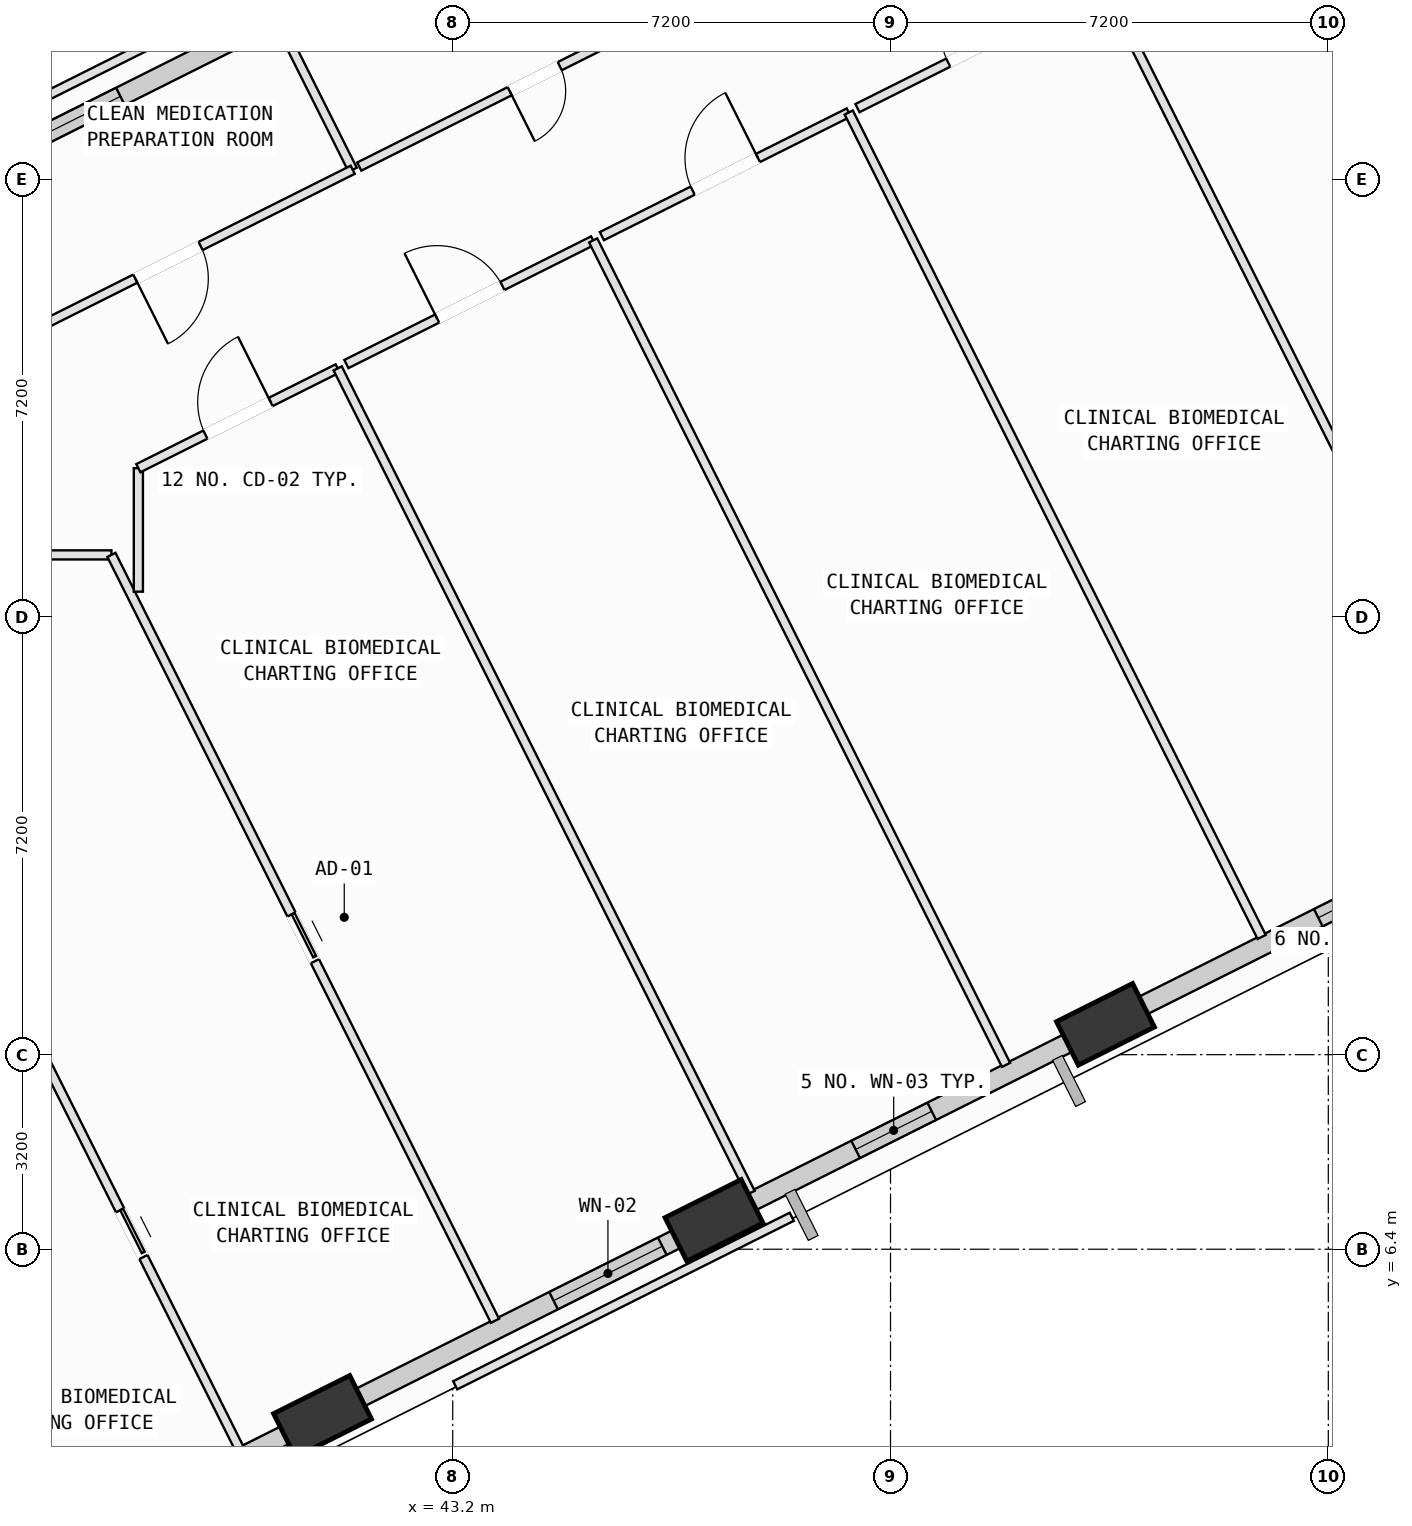
"""IFC4 building model, lengths in metres.
Left out: names, types, materials, properties, quantities, classifications, styles, units other than length and angle.
Written with IfcOpenShell. Run it as: python <this file> out.ifc"""

import sys

from ifc_helpers import new_model, si_unit, direction, frame, frame_2d, origin, origin_2d, place, context, subcontext, project, spatial, rectangle, extrude, element, fill, save


model = new_model("IFC4")
c1 = context("Model", 3, precision=1e-05, world=origin(), true_north=direction((0.0, 1.0)))
c2 = subcontext(c1, "Body", "Model", "MODEL_VIEW")
j1 = project(units=[si_unit("LENGTHUNIT", "METRE"), si_unit("PLANEANGLEUNIT", "RADIAN")], contexts=[c1])
p1 = place(None, origin())
s1 = spatial("IfcSite", under=j1, at=p1, CompositionType="ELEMENT")
p2 = place(p1, origin())
s2 = spatial("IfcBuilding", under=s1, at=p2, CompositionType="ELEMENT")
p3 = place(p2, frame((0.0, 0.0, 136.4)))
s3 = spatial("IfcBuildingStorey", under=s2, at=p3, CompositionType="ELEMENT", Elevation=136.4)
p4 = place(p3, frame((41.059, 3.651, 0.002), z_axis=(0.087045946082, 0.031509294249, 0.995705864021), x_axis=(-0.7235601559, 0.68901563881, 0.041450576223)))
e1 = element("IfcColumn", 1, at=p4, inside=s3, PredefinedType="COLUMN", context=c2, shape_type="SweptSolid", body=[
    extrude(rectangle(XDim=1.4, YDim=0.8, at=origin_2d()), origin(), (0.0, 0.0, 1.0), 4.014),
])
p5 = place(p3, frame((47.497, 6.875, 0.002), z_axis=(0.073474149126, 0.057964291488, 0.995611214442), x_axis=(-0.903804980406, 0.425888036512, 0.041903910901)))
e2 = element("IfcColumn", 2, at=p5, inside=s3, PredefinedType="COLUMN", context=c2, shape_type="SweptSolid", body=[
    extrude(rectangle(XDim=1.4, YDim=0.8, at=origin_2d()), origin(), (0.0, 0.0, 1.0), 4.014),
])
p6 = place(p3, frame((53.935, 10.099, 0.002), z_axis=(0.059912602707, 0.084339444784, 0.994634273535), x_axis=(-0.986866301457, 0.154755115005, 0.046322321071)))
e3 = element("IfcColumn", 3, at=p6, inside=s3, PredefinedType="COLUMN", context=c2, shape_type="SweptSolid", body=[
    extrude(rectangle(XDim=1.4, YDim=0.8, at=origin_2d()), origin(), (0.0, 0.0, 1.0), 4.018),
])
p7 = place(p3, frame((40.781, 3.512, 0.0), z_axis=(0.0, 0.0, 1.0), x_axis=(-0.894152006982, -0.447763540734, 0.0)))
e4 = element("IfcWall", 4, at=p7, inside=s3, PredefinedType="SOLIDWALL", context=c2, shape_type="SweptSolid", body=[
    extrude(rectangle(XDim=6.214, YDim=0.32, at=frame_2d((3.107, 0.0))), origin(), (0.0, 0.0, 1.0), 3.165),
])
p8 = place(p7, frame((2.619, 0.0, 0.75)))
e5 = element("IfcOpeningElement", 5, at=p8, cuts=e4, PredefinedType="OPENING", context=c2, shape_type="SweptSolid", body=[
    extrude(rectangle(XDim=1.6, YDim=1.95, at=frame_2d((0.8, 0.975))), frame((0.0, 0.17, 0.0), z_axis=(0.0, -1.0, 0.0), x_axis=(1.0, 0.0, 0.0)), (0.0, 0.0, 1.0), 0.34),
])
p9 = place(p3, frame((47.219, 6.736, 0.0), z_axis=(0.0, 0.0, 1.0), x_axis=(-0.894159648303, -0.447748281232, 0.0)))
e6 = element("IfcWall", 6, at=p9, inside=s3, PredefinedType="SOLIDWALL", context=c2, shape_type="SweptSolid", body=[
    extrude(rectangle(XDim=6.209, YDim=0.32, at=frame_2d((3.104, 0.0))), origin(), (0.0, 0.0, 1.0), 3.165),
])
p10 = place(p9, frame((0.64, 0.0, 0.75)))
e7 = element("IfcOpeningElement", 7, at=p10, cuts=e6, PredefinedType="OPENING", context=c2, shape_type="SweptSolid", body=[
    extrude(rectangle(XDim=2.0, YDim=1.95, at=frame_2d((1.0, 0.975))), frame((0.0, 0.17, 0.0), z_axis=(0.0, -1.0, 0.0), x_axis=(1.0, 0.0, 0.0)), (0.0, 0.0, 1.0), 0.34),
])
p11 = place(p3, frame((53.664, 9.963, 0.0), z_axis=(0.0, 0.0, 1.0), x_axis=(-0.894160047845, -0.447747483341, 0.0)))
e8 = element("IfcWall", 8, at=p11, inside=s3, PredefinedType="SOLIDWALL", context=c2, shape_type="SweptSolid", body=[
    extrude(rectangle(XDim=6.218, YDim=0.32, at=frame_2d((3.109, 0.0))), origin(), (0.0, 0.0, 1.0), 3.165),
])
p12 = place(p11, frame((2.892, 0.0, 0.75)))
e9 = element("IfcOpeningElement", 9, at=p12, cuts=e8, PredefinedType="OPENING", context=c2, shape_type="SweptSolid", body=[
    extrude(rectangle(XDim=1.4, YDim=1.85, at=frame_2d((0.7, 0.925))), frame((0.0, 0.17, 0.0), z_axis=(0.0, -1.0, 0.0), x_axis=(1.0, 0.0, 0.0)), (0.0, 0.0, 1.0), 0.34),
])
p13 = place(p3, frame((60.116, 13.194, 0.0), z_axis=(0.0, 0.0, 1.0), x_axis=(-0.894161076432, -0.447745429227, 0.0)))
e10 = element("IfcWall", 10, at=p13, inside=s3, PredefinedType="SOLIDWALL", context=c2, shape_type="SweptSolid", body=[
    extrude(rectangle(XDim=6.242, YDim=0.32, at=frame_2d((3.121, 0.0))), origin(), (0.0, 0.0, 1.0), 3.165),
])
p14 = place(p13, frame((1.198, 0.0, 0.75)))
e11 = element("IfcOpeningElement", 11, at=p14, cuts=e10, PredefinedType="OPENING", context=c2, shape_type="SweptSolid", body=[
    extrude(rectangle(XDim=1.8, YDim=2.05, at=frame_2d((0.9, 1.025))), frame((0.0, 0.17, 0.0), z_axis=(0.0, -1.0, 0.0), x_axis=(1.0, 0.0, 0.0)), (0.0, 0.0, 1.0), 0.34),
])
p15 = place(p3, frame((53.303, 32.8, 0.0), z_axis=(0.0, 0.0, 1.0), x_axis=(0.579127420341, -0.815237039768, 0.0)))
e12 = element("IfcWall", 12, at=p15, inside=s3, PredefinedType="SOLIDWALL", context=c2, shape_type="SweptSolid", body=[
    extrude(rectangle(XDim=8.838, YDim=0.32, at=frame_2d((4.419, 0.0))), origin(), (0.0, 0.0, 1.0), 3.165),
])
p16 = place(p3, frame((35.016, 23.999, 0.0), z_axis=(0.0, 0.0, 1.0), x_axis=(0.89415974242, 0.447748093279, 0.0)))
e13 = element("IfcWall", 13, at=p16, inside=s3, PredefinedType="SOLIDWALL", context=c2, shape_type="SweptSolid", body=[
    extrude(rectangle(XDim=6.211, YDim=0.32, at=frame_2d((3.105, 0.0))), origin(), (0.0, 0.0, 1.0), 3.165),
])
p17 = place(p16, frame((1.241, 0.0, 0.75)))
e14 = element("IfcOpeningElement", 14, at=p17, cuts=e13, PredefinedType="OPENING", context=c2, shape_type="SweptSolid", body=[
    extrude(rectangle(XDim=1.8, YDim=2.05, at=frame_2d((0.9, 1.025))), frame((0.0, 0.17, 0.0), z_axis=(0.0, -1.0, 0.0), x_axis=(1.0, 0.0, 0.0)), (0.0, 0.0, 1.0), 0.34),
])
p18 = place(p3, frame((36.15, 10.194, 0.0), z_axis=(0.0, 0.0, 1.0), x_axis=(0.447781215356, -0.894143155862, 0.0)))
e15 = element("IfcWall", 15, at=p18, inside=s3, PredefinedType="PARTITIONING", context=c2, shape_type="SweptSolid", body=[
    extrude(rectangle(XDim=7.913, YDim=0.15, at=frame_2d((3.957, 0.0))), origin(), (0.0, 0.0, 1.0), 3.78),
])
p19 = place(p18, frame((3.526, 0.0, 0.0)))
e16 = element("IfcOpeningElement", 16, at=p19, cuts=e15, PredefinedType="OPENING", context=c2, shape_type="SweptSolid", body=[
    extrude(rectangle(XDim=0.86, YDim=2.06, at=frame_2d((0.43, 1.03))), frame((0.0, 0.085, 0.0), z_axis=(0.0, -1.0, 0.0), x_axis=(1.0, 0.0, 0.0)), (0.0, 0.0, 1.0), 0.17),
])
p20 = place(p3, frame((36.5, 17.82, 0.0), z_axis=(0.0, 0.0, 1.0), x_axis=(1.0, 0.0, 0.0)))
e17 = element("IfcWall", 17, at=p20, inside=s3, PredefinedType="PARTITIONING", context=c2, shape_type="SweptSolid", body=[
    extrude(rectangle(XDim=1.087, YDim=0.15, at=frame_2d((0.543, 0.0))), origin(), (0.0, 0.0, 1.0), 2.965),
])
p21 = place(p3, frame((37.587, 17.82, 0.0), z_axis=(0.0, 0.0, 1.0), x_axis=(0.447754187631, -0.894156690664, 0.0)))
e18 = element("IfcWall", 18, at=p21, inside=s3, PredefinedType="PARTITIONING", context=c2, shape_type="SweptSolid", body=[
    extrude(rectangle(XDim=14.088, YDim=0.15, at=frame_2d((7.044, 0.0))), origin(), (0.0, 0.0, 1.0), 3.78),
])
p22 = place(p21, frame((6.614, 0.0, 0.0)))
e19 = element("IfcOpeningElement", 19, at=p22, cuts=e18, PredefinedType="OPENING", context=c2, shape_type="SweptSolid", body=[
    extrude(rectangle(XDim=0.86, YDim=2.06, at=frame_2d((0.43, 1.03))), frame((0.0, 0.085, 0.0), z_axis=(0.0, -1.0, 0.0), x_axis=(1.0, 0.0, 0.0)), (0.0, 0.0, 1.0), 0.17),
])
p23 = place(p3, frame((41.77, 3.75, 0.0), z_axis=(0.0, 0.0, 1.0), x_axis=(-0.893983331668, -0.448100215019, 0.0)))
e20 = element("IfcWall", 20, at=p23, inside=s3, PredefinedType="PARTITIONING", context=c2, shape_type="SweptSolid", body=[
    extrude(rectangle(XDim=0.991, YDim=0.15, at=frame_2d((0.496, 0.0))), origin(), (0.0, 0.0, 1.0), 3.165),
])
p24 = place(p3, frame((38.03, 17.215, 0.0), z_axis=(0.0, 0.0, 1.0), x_axis=(0.0, 1.0, 0.0)))
e21 = element("IfcWall", 21, at=p24, inside=s3, PredefinedType="PARTITIONING", context=c2, shape_type="SweptSolid", body=[
    extrude(rectangle(XDim=2.031, YDim=0.15, at=frame_2d((1.016, 0.0))), origin(), (0.0, 0.0, 1.0), 3.78),
])
p25 = place(p3, frame((38.03, 19.246, 0.0), z_axis=(0.0, 0.0, 1.0), x_axis=(0.894227304173, 0.447613146, 0.0)))
e22 = element("IfcWall", 22, at=p25, inside=s3, PredefinedType="PARTITIONING", context=c2, shape_type="SweptSolid", body=[
    extrude(rectangle(XDim=3.666, YDim=0.15, at=frame_2d((1.833, 0.0))), origin(), (0.0, 0.0, 1.0), 2.945),
])
p26 = place(p25, frame((1.233, 0.0, 0.0)))
e23 = element("IfcOpeningElement", 23, at=p26, cuts=e22, PredefinedType="OPENING", context=c2, shape_type="SweptSolid", body=[
    extrude(rectangle(XDim=1.2, YDim=2.15, at=frame_2d((0.6, 1.075))), frame((0.0, 0.085, 0.0), z_axis=(0.0, -1.0, 0.0), x_axis=(1.0, 0.0, 0.0)), (0.0, 0.0, 1.0), 0.17),
])
p27 = place(p3, frame((41.308, 20.887, 0.0), z_axis=(0.0, 0.0, 1.0), x_axis=(0.447793043956, -0.894137232076, 0.0)))
e24 = element("IfcWall", 24, at=p27, inside=s3, PredefinedType="PARTITIONING", context=c2, shape_type="SweptSolid", body=[
    extrude(rectangle(XDim=15.166, YDim=0.15, at=frame_2d((7.583, 0.0))), origin(), (0.0, 0.0, 1.0), 3.78),
])
p28 = place(p3, frame((41.451, 20.959, 0.0), z_axis=(0.0, 0.0, 1.0), x_axis=(0.894125827082, 0.447815816319, 0.0)))
e25 = element("IfcWall", 25, at=p28, inside=s3, PredefinedType="PARTITIONING", context=c2, shape_type="SweptSolid", body=[
    extrude(rectangle(XDim=4.54, YDim=0.15, at=frame_2d((2.27, 0.0))), origin(), (0.0, 0.0, 1.0), 3.78),
])
p29 = place(p28, frame((1.67, 0.0, 0.0)))
e26 = element("IfcOpeningElement", 26, at=p29, cuts=e25, PredefinedType="OPENING", context=c2, shape_type="SweptSolid", body=[
    extrude(rectangle(XDim=1.2, YDim=2.15, at=frame_2d((0.6, 1.075))), frame((0.0, 0.085, 0.0), z_axis=(0.0, -1.0, 0.0), x_axis=(1.0, 0.0, 0.0)), (0.0, 0.0, 1.0), 0.17),
])
p30 = place(p3, frame((45.51, 22.992, 0.0), z_axis=(0.0, 0.0, 1.0), x_axis=(0.447741560251, -0.894163013787, 0.0)))
e27 = element("IfcWall", 27, at=p30, inside=s3, PredefinedType="PARTITIONING", context=c2, shape_type="SweptSolid", body=[
    extrude(rectangle(XDim=15.165, YDim=0.15, at=frame_2d((7.583, 0.0))), origin(), (0.0, 0.0, 1.0), 3.365),
])
p31 = place(p3, frame((45.653, 23.063, 0.0), z_axis=(0.0, 0.0, 1.0), x_axis=(0.894158174305, 0.447751224815, 0.0)))
e28 = element("IfcWall", 28, at=p31, inside=s3, PredefinedType="PARTITIONING", context=c2, shape_type="SweptSolid", body=[
    extrude(rectangle(XDim=4.54, YDim=0.15, at=frame_2d((2.27, 0.0))), origin(), (0.0, 0.0, 1.0), 3.78),
])
p32 = place(p31, frame((1.67, 0.0, 0.0)))
e29 = element("IfcOpeningElement", 29, at=p32, cuts=e28, PredefinedType="OPENING", context=c2, shape_type="SweptSolid", body=[
    extrude(rectangle(XDim=1.2, YDim=2.15, at=frame_2d((0.6, 1.075))), frame((0.0, 0.085, 0.0), z_axis=(0.0, -1.0, 0.0), x_axis=(1.0, 0.0, 0.0)), (0.0, 0.0, 1.0), 0.17),
])
p33 = place(p3, frame((49.713, 25.096, 0.0), z_axis=(0.0, 0.0, 1.0), x_axis=(0.447793043956, -0.894137232076, 0.0)))
e30 = element("IfcWall", 30, at=p33, inside=s3, PredefinedType="PARTITIONING", context=c2, shape_type="SweptSolid", body=[
    extrude(rectangle(XDim=15.166, YDim=0.15, at=frame_2d((7.583, 0.0))), origin(), (0.0, 0.0, 1.0), 3.78),
])
p34 = place(p3, frame((54.637, 10.194, 0.0), z_axis=(0.0, 0.0, 1.0), x_axis=(-0.893975105613, -0.448116626052, 0.0)))
e31 = element("IfcWall", 31, at=p34, inside=s3, PredefinedType="PARTITIONING", context=c2, shape_type="SweptSolid", body=[
    extrude(rectangle(XDim=0.973, YDim=0.15, at=frame_2d((0.487, 0.0))), origin(), (0.0, 0.0, 1.0), 3.165),
])
p35 = place(p3, frame((49.856, 25.168, 0.0), z_axis=(0.0, 0.0, 1.0), x_axis=(0.894125827082, 0.447815816319, 0.0)))
e32 = element("IfcWall", 32, at=p35, inside=s3, PredefinedType="PARTITIONING", context=c2, shape_type="SweptSolid", body=[
    extrude(rectangle(XDim=4.54, YDim=0.15, at=frame_2d((2.27, 0.0))), origin(), (0.0, 0.0, 1.0), 3.78),
])
p36 = place(p35, frame((1.67, 0.0, 0.0)))
e33 = element("IfcOpeningElement", 33, at=p36, cuts=e32, PredefinedType="OPENING", context=c2, shape_type="SweptSolid", body=[
    extrude(rectangle(XDim=1.2, YDim=2.15, at=frame_2d((0.6, 1.075))), frame((0.0, 0.085, 0.0), z_axis=(0.0, -1.0, 0.0), x_axis=(1.0, 0.0, 0.0)), (0.0, 0.0, 1.0), 0.17),
])
p37 = place(p3, frame((53.915, 27.201, 0.0), z_axis=(0.0, 0.0, 1.0), x_axis=(0.447723711444, -0.894171951143, 0.0)))
e34 = element("IfcWall", 34, at=p37, inside=s3, PredefinedType="PARTITIONING", context=c2, shape_type="SweptSolid", body=[
    extrude(rectangle(XDim=14.739, YDim=0.15, at=frame_2d((7.369, 0.0))), origin(), (0.0, 0.0, 1.0), 3.78),
])
p38 = place(p3, frame((40.366, 26.528, 0.0), z_axis=(0.0, 0.0, 1.0), x_axis=(0.447801985911, -0.894132753798, 0.0)))
e35 = element("IfcWall", 35, at=p38, inside=s3, PredefinedType="PARTITIONING", context=c2, shape_type="SweptSolid", body=[
    extrude(rectangle(XDim=2.655, YDim=0.15, at=frame_2d((1.328, 0.0))), origin(), (0.0, 0.0, 1.0), 3.78),
])
p39 = place(p3, frame((41.555, 24.154, 0.0), z_axis=(0.0, 0.0, 1.0), x_axis=(-0.894132389876, -0.447802712558, 0.0)))
e36 = element("IfcWall", 36, at=p39, inside=s3, PredefinedType="PARTITIONING", context=c2, shape_type="SweptSolid", body=[
    extrude(rectangle(XDim=6.795, YDim=0.15, at=frame_2d((3.398, 0.0))), origin(), (0.0, 0.0, 1.0), 3.78),
])
p40 = place(p39, frame((2.798, 0.0, 0.0)))
e37 = element("IfcOpeningElement", 37, at=p40, cuts=e36, PredefinedType="OPENING", context=c2, shape_type="SweptSolid", body=[
    extrude(rectangle(XDim=1.2, YDim=2.15, at=frame_2d((0.6, 1.075))), frame((0.0, 0.085, 0.0), z_axis=(0.0, -1.0, 0.0), x_axis=(1.0, 0.0, 0.0)), (0.0, 0.0, 1.0), 0.17),
])
p41 = place(p3, frame((33.983, 24.097, 0.0), z_axis=(0.0, 0.0, 1.0), x_axis=(0.894136196348, 0.447795112055, 0.0)))
e38 = element("IfcWall", 38, at=p41, inside=s3, PredefinedType="PARTITIONING", context=c2, shape_type="SweptSolid", body=[
    extrude(rectangle(XDim=5.373, YDim=0.15, at=frame_2d((2.687, 0.0))), origin(), (0.0, 0.0, 1.0), 3.78),
])
p42 = place(p3, frame((47.435, 27.098, 0.0), z_axis=(0.0, 0.0, 1.0), x_axis=(-0.894124431729, -0.447818602322, 0.0)))
e39 = element("IfcWall", 39, at=p42, inside=s3, PredefinedType="PARTITIONING", context=c2, shape_type="SweptSolid", body=[
    extrude(rectangle(XDim=6.456, YDim=0.15, at=frame_2d((3.228, 0.0))), origin(), (0.0, 0.0, 1.0), 2.945),
])
p43 = place(p42, frame((2.768, 0.0, 0.0)))
e40 = element("IfcOpeningElement", 40, at=p43, cuts=e39, PredefinedType="OPENING", context=c2, shape_type="SweptSolid", body=[
    extrude(rectangle(XDim=0.92, YDim=2.1, at=frame_2d((0.46, 1.05))), frame((0.0, 0.085, 0.0), z_axis=(0.0, -1.0, 0.0), x_axis=(1.0, 0.0, 0.0)), (0.0, 0.0, 1.0), 0.17),
])
p44 = place(p3, frame((48.776, 6.934, 0.0), z_axis=(0.0, 0.0, 1.0), x_axis=(-0.894135147504, -0.447797206332, 0.0)))
e41 = element("IfcWall", 41, at=p44, inside=s3, PredefinedType="PARTITIONING", context=c2, shape_type="SweptSolid", body=[
    extrude(rectangle(XDim=6.19, YDim=0.15, at=frame_2d((3.095, 0.0))), origin(), (0.0, 0.0, 1.0), 3.78),
])
p45 = place(p3, frame((57.425, 29.036, 0.0), z_axis=(0.0, 0.0, 1.0), x_axis=(0.447765303892, -0.894151124045, 0.0)))
e42 = element("IfcWall", 42, at=p45, inside=s3, PredefinedType="PARTITIONING", context=c2, shape_type="SweptSolid", body=[
    extrude(rectangle(XDim=12.919, YDim=0.15, at=frame_2d((6.46, 0.0))), origin(), (0.0, 0.0, 1.0), 3.165),
])
p46 = place(p10, origin())
e43 = element("IfcWindow", 43, at=p46, inside=s3, PartitioningType="SINGLE_PANEL", PredefinedType="WINDOW", context=c2, shape_type="SweptSolid", body=[
    extrude(rectangle(XDim=2.0, YDim=1.95, at=frame_2d((1.0, 0.975))), frame((0.0, 0.03, 0.0), z_axis=(0.0, -1.0, 0.0), x_axis=(1.0, 0.0, 0.0)), (0.0, 0.0, 1.0), 0.06),
])
fill(e7, e43)
p47 = place(p12, origin())
e44 = element("IfcWindow", 44, at=p47, inside=s3, PartitioningType="SINGLE_PANEL", PredefinedType="WINDOW", context=c2, shape_type="SweptSolid", body=[
    extrude(rectangle(XDim=1.4, YDim=1.85, at=frame_2d((0.7, 0.925))), frame((0.0, 0.03, 0.0), z_axis=(0.0, -1.0, 0.0), x_axis=(1.0, 0.0, 0.0)), (0.0, 0.0, 1.0), 0.06),
])
fill(e9, e44)
p48 = place(p14, origin())
e45 = element("IfcWindow", 45, at=p48, inside=s3, PartitioningType="SINGLE_PANEL", PredefinedType="WINDOW", context=c2, shape_type="SweptSolid", body=[
    extrude(rectangle(XDim=1.8, YDim=2.05, at=frame_2d((0.9, 1.025))), frame((0.0, 0.03, 0.0), z_axis=(0.0, -1.0, 0.0), x_axis=(1.0, 0.0, 0.0)), (0.0, 0.0, 1.0), 0.06),
])
fill(e11, e45)
p49 = place(p17, origin())
e46 = element("IfcWindow", 46, at=p49, inside=s3, PartitioningType="SINGLE_PANEL", PredefinedType="WINDOW", context=c2, shape_type="SweptSolid", body=[
    extrude(rectangle(XDim=1.8, YDim=2.05, at=frame_2d((0.9, 1.025))), frame((0.0, 0.03, 0.0), z_axis=(0.0, -1.0, 0.0), x_axis=(1.0, 0.0, 0.0)), (0.0, 0.0, 1.0), 0.06),
])
fill(e14, e46)
p50 = place(p26, origin())
e47 = element("IfcDoor", 47, at=p50, inside=s3, OperationType="SINGLE_SWING_RIGHT", PredefinedType="DOOR", context=c2, shape_type="SweptSolid", body=[
    extrude(rectangle(XDim=1.2, YDim=2.15, at=frame_2d((0.6, 1.075))), frame((0.0, 0.025, 0.0), z_axis=(0.0, -1.0, 0.0), x_axis=(1.0, 0.0, 0.0)), (0.0, 0.0, 1.0), 0.05),
])
fill(e23, e47)
p51 = place(p29, origin())
e48 = element("IfcDoor", 48, at=p51, inside=s3, OperationType="SINGLE_SWING_LEFT", PredefinedType="DOOR", context=c2, shape_type="SweptSolid", body=[
    extrude(rectangle(XDim=1.2, YDim=2.15, at=frame_2d((0.6, 1.075))), frame((0.0, 0.025, 0.0), z_axis=(0.0, -1.0, 0.0), x_axis=(1.0, 0.0, 0.0)), (0.0, 0.0, 1.0), 0.05),
])
fill(e26, e48)
p52 = place(p32, origin())
e49 = element("IfcDoor", 49, at=p52, inside=s3, OperationType="SINGLE_SWING_RIGHT", PredefinedType="DOOR", context=c2, shape_type="SweptSolid", body=[
    extrude(rectangle(XDim=1.2, YDim=2.15, at=frame_2d((0.6, 1.075))), frame((0.0, 0.025, 0.0), z_axis=(0.0, -1.0, 0.0), x_axis=(1.0, 0.0, 0.0)), (0.0, 0.0, 1.0), 0.05),
])
fill(e29, e49)
p53 = place(p36, origin())
e50 = element("IfcDoor", 50, at=p53, inside=s3, OperationType="SINGLE_SWING_RIGHT", PredefinedType="DOOR", context=c2, shape_type="SweptSolid", body=[
    extrude(rectangle(XDim=1.2, YDim=2.15, at=frame_2d((0.6, 1.075))), frame((0.0, 0.025, 0.0), z_axis=(0.0, -1.0, 0.0), x_axis=(1.0, 0.0, 0.0)), (0.0, 0.0, 1.0), 0.05),
])
fill(e33, e50)
p54 = place(p40, origin())
e51 = element("IfcDoor", 51, at=p54, inside=s3, OperationType="SINGLE_SWING_RIGHT", PredefinedType="DOOR", context=c2, shape_type="SweptSolid", body=[
    extrude(rectangle(XDim=1.2, YDim=2.15, at=frame_2d((0.6, 1.075))), frame((0.0, 0.025, 0.0), z_axis=(0.0, -1.0, 0.0), x_axis=(1.0, 0.0, 0.0)), (0.0, 0.0, 1.0), 0.05),
])
fill(e37, e51)
p55 = place(p43, origin())
e52 = element("IfcDoor", 52, at=p55, inside=s3, OperationType="SINGLE_SWING_RIGHT", PredefinedType="DOOR", context=c2, shape_type="SweptSolid", body=[
    extrude(rectangle(XDim=0.92, YDim=2.1, at=frame_2d((0.46, 1.05))), frame((0.0, 0.025, 0.0), z_axis=(0.0, -1.0, 0.0), x_axis=(1.0, 0.0, 0.0)), (0.0, 0.0, 1.0), 0.05),
])
fill(e40, e52)
p56 = place(p22, origin())
e53 = element("IfcDoor", 53, at=p56, inside=s3, OperationType="SLIDING_TO_LEFT", PredefinedType="DOOR", context=c2, shape_type="SweptSolid", body=[
    extrude(rectangle(XDim=0.86, YDim=2.06, at=frame_2d((0.43, 1.03))), frame((0.0, 0.025, 0.0), z_axis=(0.0, -1.0, 0.0), x_axis=(1.0, 0.0, 0.0)), (0.0, 0.0, 1.0), 0.05),
])
fill(e19, e53)
p57 = place(p19, origin())
e54 = element("IfcDoor", 54, at=p57, inside=s3, OperationType="SLIDING_TO_LEFT", PredefinedType="DOOR", context=c2, shape_type="SweptSolid", body=[
    extrude(rectangle(XDim=0.86, YDim=2.06, at=frame_2d((0.43, 1.03))), frame((0.0, 0.025, 0.0), z_axis=(0.0, -1.0, 0.0), x_axis=(1.0, 0.0, 0.0)), (0.0, 0.0, 1.0), 0.05),
])
fill(e16, e54)
save(model, sys.argv[1])
